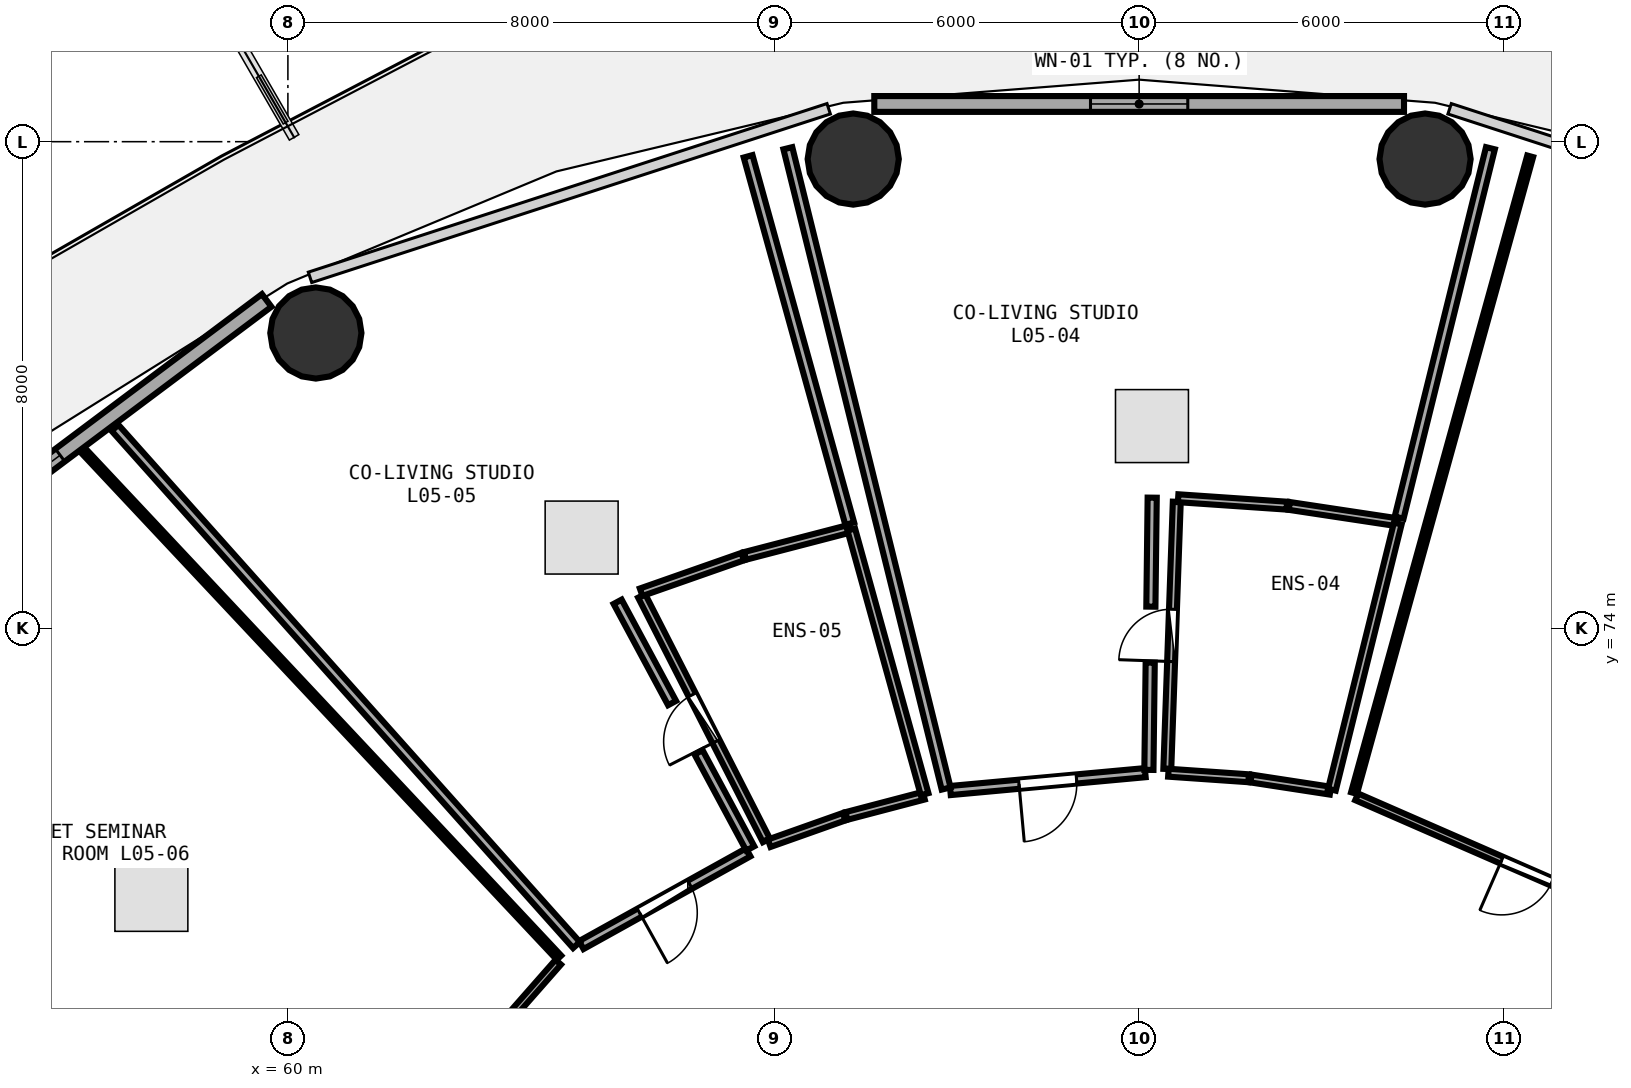
"""IFC4 building model, lengths in metres.
Left out: names, types, materials, properties, quantities, classifications, styles, units other than length and angle.
Written with IfcOpenShell. Run it as: python <this file> out.ifc"""

import sys

from ifc_helpers import new_model, si_unit, direction, frame, frame_2d, origin, origin_2d, place, context, subcontext, project, spatial, rectangle, circle, extrude, element, fill, save


model = new_model("IFC4")
c1 = context("Model", 3, precision=1e-05, world=origin(), true_north=direction((0.0, 1.0)))
c2 = subcontext(c1, "Body", "Model", "MODEL_VIEW")
j1 = project(units=[si_unit("LENGTHUNIT", "METRE"), si_unit("PLANEANGLEUNIT", "RADIAN")], contexts=[c1])
p1 = place(None, origin())
s1 = spatial("IfcSite", under=j1, at=p1, CompositionType="ELEMENT")
p2 = place(p1, origin())
s2 = spatial("IfcBuilding", under=s1, at=p2, CompositionType="ELEMENT")
p3 = place(p2, frame((0.0, 0.0, 22.5)))
s3 = spatial("IfcBuildingStorey", under=s2, at=p3, CompositionType="ELEMENT", Elevation=22.5)
for number, where, z_axis, x_axis in (
    (1, (78.702, 81.714, 0.0), (0.0, 0.0, 1.0), (1.0, 0.0, 0.0)),
    (2, (69.298, 81.714, 0.0), (0.0, 0.0, 1.0), (1.0, 0.0, 0.0)),
    (3, (60.46, 78.854, 0.0), (0.0, 0.0, 1.0), (1.0, 0.0, 0.0)),
):
    element("IfcColumn", number, at=place(p3, frame(where, z_axis=z_axis, x_axis=x_axis)), inside=s3, PredefinedType="COLUMN", context=c2, shape_type="SweptSolid", body=[
        extrude(circle(Radius=0.75, at=origin_2d()), origin(), (0.0, 0.0, 1.0), 3.75),
    ])
p4 = place(p3, frame((78.356, 82.62, 0.0), z_axis=(0.0, 0.0, 1.0), x_axis=(-1.0, 0.0, 0.0)))
e4 = element("IfcWall", 4, at=p4, inside=s3, PredefinedType="SOLIDWALL", context=c2, shape_type="SweptSolid", body=[
    extrude(rectangle(XDim=8.712, YDim=0.26, at=frame_2d((4.356, 0.0))), origin(), (0.0, 0.0, 1.0), 3.475),
])
p5 = place(p4, frame((3.556, 0.0, 0.85)))
e5 = element("IfcOpeningElement", 5, at=p5, cuts=e4, PredefinedType="OPENING", context=c2, shape_type="SweptSolid", body=[
    extrude(rectangle(XDim=1.6, YDim=1.45, at=frame_2d((0.8, 0.725))), frame((0.0, 0.14, 0.0), z_axis=(0.0, -1.0, 0.0), x_axis=(1.0, 0.0, 0.0)), (0.0, 0.0, 1.0), 0.28),
])
p6 = place(p3, frame((59.651, 79.389, 0.0), z_axis=(0.0, 0.0, 1.0), x_axis=(-0.80030733173, -0.599590005569, 0.0)))
e6 = element("IfcWall", 6, at=p6, inside=s3, PredefinedType="SOLIDWALL", context=c2, shape_type="SweptSolid", body=[
    extrude(rectangle(XDim=8.291, YDim=0.26, at=frame_2d((4.145, 0.0))), origin(), (0.0, 0.0, 1.0), 3.475),
])
p7 = place(p6, frame((4.245, 0.0, 0.85)))
e7 = element("IfcOpeningElement", 7, at=p7, cuts=e6, PredefinedType="OPENING", context=c2, shape_type="SweptSolid", body=[
    extrude(rectangle(XDim=1.6, YDim=1.45, at=frame_2d((0.8, 0.725))), frame((0.0, 0.14, 0.0), z_axis=(0.0, -1.0, 0.0), x_axis=(1.0, 0.0, 0.0)), (0.0, 0.0, 1.0), 0.28),
])
p8 = place(p3, frame((83.172, 68.783, 0.0), z_axis=(0.0, 0.0, 1.0), x_axis=(-0.916419655578, 0.400218708797, 0.0)))
e8 = element("IfcWall", 8, at=p8, inside=s3, PredefinedType="PARTITIONING", context=c2, shape_type="SweptSolid", body=[
    extrude(rectangle(XDim=6.104, YDim=0.12, at=frame_2d((3.052, 0.0))), origin(), (0.0, 0.0, 1.0), 2.875),
])
p9 = place(p8, frame((2.602, 0.0, 0.0)))
e9 = element("IfcOpeningElement", 9, at=p9, cuts=e8, PredefinedType="OPENING", context=c2, shape_type="SweptSolid", body=[
    extrude(rectangle(XDim=0.9, YDim=2.08, at=frame_2d((0.45, 1.04))), frame((0.0, 0.07, 0.0), z_axis=(0.0, -1.0, 0.0), x_axis=(1.0, 0.0, 0.0)), (0.0, 0.0, 1.0), 0.14),
])
p10 = place(p3, frame((74.463, 71.684, 0.0), z_axis=(0.0, 0.0, 1.0), x_axis=(0.035428098094, 0.999372227884, 0.0)))
e10 = element("IfcWall", 10, at=p10, inside=s3, PredefinedType="PLUMBINGWALL", context=c2, shape_type="SweptSolid", body=[
    extrude(rectangle(XDim=4.396, YDim=0.13, at=frame_2d((2.198, 0.0))), origin(), (0.0, 0.0, 1.0), 3.175),
])
p11 = place(p10, frame((1.768, 0.0, 0.0)))
e11 = element("IfcOpeningElement", 11, at=p11, cuts=e10, PredefinedType="OPENING", context=c2, shape_type="SweptSolid", body=[
    extrude(rectangle(XDim=0.86, YDim=2.05, at=frame_2d((0.43, 1.025))), frame((0.0, 0.075, 0.0), z_axis=(0.0, -1.0, 0.0), x_axis=(1.0, 0.0, 0.0)), (0.0, 0.0, 1.0), 0.15),
])
p12 = place(p3, frame((74.1, 71.624, 0.0), z_axis=(0.0, 0.0, 1.0), x_axis=(-0.995822031417, -0.091315287572, 0.0)))
e12 = element("IfcWall", 12, at=p12, inside=s3, PredefinedType="PARTITIONING", context=c2, shape_type="SweptSolid", body=[
    extrude(rectangle(XDim=3.219, YDim=0.15, at=frame_2d((1.609, 0.0))), origin(), (0.0, 0.0, 1.0), 3.235),
])
p13 = place(p12, frame((1.135, 0.0, 0.0)))
e13 = element("IfcOpeningElement", 13, at=p13, cuts=e12, PredefinedType="OPENING", context=c2, shape_type="SweptSolid", body=[
    extrude(rectangle(XDim=0.95, YDim=2.08, at=frame_2d((0.475, 1.04))), frame((0.0, 0.085, 0.0), z_axis=(0.0, -1.0, 0.0), x_axis=(1.0, 0.0, 0.0)), (0.0, 0.0, 1.0), 0.17),
])
p14 = place(p3, frame((67.87, 70.51, 0.0), z_axis=(0.0, 0.0, 1.0), x_axis=(-0.45442479933, 0.890785104138, 0.0)))
e14 = element("IfcWall", 14, at=p14, inside=s3, PredefinedType="PLUMBINGWALL", context=c2, shape_type="SweptSolid", body=[
    extrude(rectangle(XDim=4.514, YDim=0.13, at=frame_2d((2.257, 0.0))), origin(), (0.0, 0.0, 1.0), 3.175),
])
p15 = place(p14, frame((1.827, 0.0, 0.0)))
e15 = element("IfcOpeningElement", 15, at=p15, cuts=e14, PredefinedType="OPENING", context=c2, shape_type="SweptSolid", body=[
    extrude(rectangle(XDim=0.86, YDim=2.05, at=frame_2d((0.43, 1.025))), frame((0.0, 0.075, 0.0), z_axis=(0.0, -1.0, 0.0), x_axis=(1.0, 0.0, 0.0)), (0.0, 0.0, 1.0), 0.15),
])
p16 = place(p3, frame((67.571, 70.313, 0.0), z_axis=(0.0, 0.0, 1.0), x_axis=(-0.874179278891, -0.48560332408, 0.0)))
e16 = element("IfcWall", 16, at=p16, inside=s3, PredefinedType="PARTITIONING", context=c2, shape_type="SweptSolid", body=[
    extrude(rectangle(XDim=3.14, YDim=0.15, at=frame_2d((1.57, 0.0))), origin(), (0.0, 0.0, 1.0), 3.48),
])
p17 = place(p16, frame((1.095, 0.0, 0.0)))
e17 = element("IfcOpeningElement", 17, at=p17, cuts=e16, PredefinedType="OPENING", context=c2, shape_type="SweptSolid", body=[
    extrude(rectangle(XDim=0.95, YDim=2.08, at=frame_2d((0.475, 1.04))), frame((0.0, 0.085, 0.0), z_axis=(0.0, -1.0, 0.0), x_axis=(1.0, 0.0, 0.0)), (0.0, 0.0, 1.0), 0.17),
])
p18 = place(p3, frame((64.446, 68.507, 0.0), z_axis=(0.0, 0.0, 1.0), x_axis=(-0.660323401664, -0.75098136143, 0.0)))
e18 = element("IfcWall", 18, at=p18, inside=s3, PredefinedType="PARTITIONING", context=c2, shape_type="SweptSolid", body=[
    extrude(rectangle(XDim=5.857, YDim=0.12, at=frame_2d((2.929, 0.0))), origin(), (0.0, 0.0, 1.0), 2.875),
])
p19 = place(p18, frame((2.479, 0.0, 0.0)))
e19 = element("IfcOpeningElement", 19, at=p19, cuts=e18, PredefinedType="OPENING", context=c2, shape_type="SweptSolid", body=[
    extrude(rectangle(XDim=0.9, YDim=2.08, at=frame_2d((0.45, 1.04))), frame((0.0, 0.07, 0.0), z_axis=(0.0, -1.0, 0.0), x_axis=(1.0, 0.0, 0.0)), (0.0, 0.0, 1.0), 0.14),
])
p20 = place(p3, frame((77.534, 71.289, 0.0), z_axis=(0.0, 0.0, 1.0), x_axis=(0.26671307518, 0.963775977875, 0.0)))
e20 = element("IfcWall", 20, at=p20, inside=s3, PredefinedType="PARTITIONING", context=c2, shape_type="SweptSolid", body=[
    extrude(rectangle(XDim=10.865, YDim=0.1, at=frame_2d((5.432, 0.0))), origin(), (0.0, 0.0, 1.0), 2.875),
])
p21 = place(p3, frame((77.145, 71.327, 0.0), z_axis=(0.0, 0.0, 1.0), x_axis=(-0.988427236939, 0.151695739152, 0.0)))
e21 = element("IfcWall", 21, at=p21, inside=s3, PredefinedType="PLUMBINGWALL", context=c2, shape_type="SweptSolid", body=[
    extrude(rectangle(XDim=1.32, YDim=0.13, at=frame_2d((0.66, 0.0))), origin(), (0.0, 0.0, 1.0), 3.235),
])
p22 = place(p3, frame((75.801, 71.531, 0.0), z_axis=(0.0, 0.0, 1.0), x_axis=(-0.997629018134, 0.068821088175, 0.0)))
e22 = element("IfcWall", 22, at=p22, inside=s3, PredefinedType="PLUMBINGWALL", context=c2, shape_type="SweptSolid", body=[
    extrude(rectangle(XDim=1.323, YDim=0.13, at=frame_2d((0.662, 0.0))), origin(), (0.0, 0.0, 1.0), 3.48),
])
p23 = place(p3, frame((74.641, 76.137, 0.0), z_axis=(0.0, 0.0, 1.0), x_axis=(0.997667905772, -0.06825503493, 0.0)))
e23 = element("IfcWall", 23, at=p23, inside=s3, PredefinedType="PLUMBINGWALL", context=c2, shape_type="SweptSolid", body=[
    extrude(rectangle(XDim=1.792, YDim=0.13, at=frame_2d((0.896, 0.0))), origin(), (0.0, 0.0, 1.0), 3.48),
])
p24 = place(p3, frame((76.469, 76.01, 0.0), z_axis=(0.0, 0.0, 1.0), x_axis=(0.988799846431, -0.14924765894, 0.0)))
e24 = element("IfcWall", 24, at=p24, inside=s3, PredefinedType="PLUMBINGWALL", context=c2, shape_type="SweptSolid", body=[
    extrude(rectangle(XDim=1.79, YDim=0.13, at=frame_2d((0.895, 0.0))), origin(), (0.0, 0.0, 1.0), 3.48),
])
p25 = place(p3, frame((78.253, 75.721, 0.0), z_axis=(0.0, 0.0, 1.0), x_axis=(-0.240229117536, -0.970716215528, 0.0)))
e25 = element("IfcWall", 25, at=p25, inside=s3, PredefinedType="PLUMBINGWALL", context=c2, shape_type="SweptSolid", body=[
    extrude(rectangle(XDim=4.509, YDim=0.13, at=frame_2d((2.255, 0.0))), origin(), (0.0, 0.0, 1.0), 3.175),
])
p26 = place(p3, frame((70.825, 71.363, 0.0), z_axis=(0.0, 0.0, 1.0), x_axis=(-0.239971369295, 0.970779965759, 0.0)))
e26 = element("IfcWall", 26, at=p26, inside=s3, PredefinedType="PARTITIONING", context=c2, shape_type="SweptSolid", body=[
    extrude(rectangle(XDim=10.846, YDim=0.15, at=frame_2d((5.423, 0.0))), origin(), (0.0, 0.0, 1.0), 2.875),
])
p27 = place(p3, frame((79.777, 81.892, 0.0), z_axis=(0.0, 0.0, 1.0), x_axis=(-0.240000910349, -0.970772662899, 0.0)))
e27 = element("IfcWall", 27, at=p27, inside=s3, PredefinedType="PARTITIONING", context=c2, shape_type="SweptSolid", body=[
    extrude(rectangle(XDim=6.257, YDim=0.15, at=frame_2d((3.128, 0.0))), origin(), (0.0, 0.0, 1.0), 2.875),
])
p28 = place(p3, frame((74.215, 76.146, 0.0), z_axis=(0.0, 0.0, 1.0), x_axis=(-0.012119496596, -0.999926556204, 0.0)))
e28 = element("IfcWall", 28, at=p28, inside=s3, PredefinedType="PARTITIONING", context=c2, shape_type="SweptSolid", body=[
    extrude(rectangle(XDim=1.793, YDim=0.15, at=frame_2d((0.896, 0.0))), origin(), (0.0, 0.0, 1.0), 3.175),
])
p29 = place(p3, frame((74.182, 73.433, 0.0), z_axis=(0.0, 0.0, 1.0), x_axis=(-0.01217734225, -0.999925853419, 0.0)))
e29 = element("IfcWall", 29, at=p29, inside=s3, PredefinedType="PARTITIONING", context=c2, shape_type="SweptSolid", body=[
    extrude(rectangle(XDim=1.764, YDim=0.15, at=frame_2d((0.882, 0.0))), origin(), (0.0, 0.0, 1.0), 3.48),
])
p30 = place(p3, frame((70.458, 71.245, 0.0), z_axis=(0.0, 0.0, 1.0), x_axis=(-0.967235526128, -0.253880753498, 0.0)))
e30 = element("IfcWall", 30, at=p30, inside=s3, PredefinedType="PLUMBINGWALL", context=c2, shape_type="SweptSolid", body=[
    extrude(rectangle(XDim=1.314, YDim=0.13, at=frame_2d((0.657, 0.0))), origin(), (0.0, 0.0, 1.0), 3.235),
])
p31 = place(p3, frame((69.148, 70.899, 0.0), z_axis=(0.0, 0.0, 1.0), x_axis=(-0.942537812533, -0.33409949408, 0.0)))
e31 = element("IfcWall", 31, at=p31, inside=s3, PredefinedType="PLUMBINGWALL", context=c2, shape_type="SweptSolid", body=[
    extrude(rectangle(XDim=1.307, YDim=0.13, at=frame_2d((0.654, 0.0))), origin(), (0.0, 0.0, 1.0), 3.48),
])
p32 = place(p3, frame((65.81, 74.591, 0.0), z_axis=(0.0, 0.0, 1.0), x_axis=(0.943615101484, 0.331044619728, 0.0)))
e32 = element("IfcWall", 32, at=p32, inside=s3, PredefinedType="PLUMBINGWALL", context=c2, shape_type="SweptSolid", body=[
    extrude(rectangle(XDim=1.77, YDim=0.13, at=frame_2d((0.885, 0.0))), origin(), (0.0, 0.0, 1.0), 3.48),
])
p33 = place(p3, frame((67.518, 75.188, 0.0), z_axis=(0.0, 0.0, 1.0), x_axis=(0.967790422801, 0.251757219427, 0.0)))
e33 = element("IfcWall", 33, at=p33, inside=s3, PredefinedType="PLUMBINGWALL", context=c2, shape_type="SweptSolid", body=[
    extrude(rectangle(XDim=1.78, YDim=0.13, at=frame_2d((0.89, 0.0))), origin(), (0.0, 0.0, 1.0), 3.48),
])
p34 = place(p3, frame((69.265, 75.622, 0.0), z_axis=(0.0, 0.0, 1.0), x_axis=(0.267094578575, -0.963670320232, 0.0)))
e34 = element("IfcWall", 34, at=p34, inside=s3, PredefinedType="PLUMBINGWALL", context=c2, shape_type="SweptSolid", body=[
    extrude(rectangle(XDim=4.516, YDim=0.13, at=frame_2d((2.258, 0.0))), origin(), (0.0, 0.0, 1.0), 2.875),
])
p35 = place(p3, frame((64.746, 68.789, 0.0), z_axis=(0.0, 0.0, 1.0), x_axis=(-0.66580890104, 0.746122313897, 0.0)))
e35 = element("IfcWall", 35, at=p35, inside=s3, PredefinedType="PARTITIONING", context=c2, shape_type="SweptSolid", body=[
    extrude(rectangle(XDim=11.399, YDim=0.15, at=frame_2d((5.7, 0.0))), origin(), (0.0, 0.0, 1.0), 2.875),
])
p36 = place(p3, frame((67.569, 81.76, 0.0), z_axis=(0.0, 0.0, 1.0), x_axis=(0.266691519666, -0.963781942837, 0.0)))
e36 = element("IfcWall", 36, at=p36, inside=s3, PredefinedType="PARTITIONING", context=c2, shape_type="SweptSolid", body=[
    extrude(rectangle(XDim=6.268, YDim=0.15, at=frame_2d((3.134, 0.0))), origin(), (0.0, 0.0, 1.0), 2.875),
])
p37 = place(p3, frame((65.423, 74.434, 0.0), z_axis=(0.0, 0.0, 1.0), x_axis=(0.473660949034, -0.880707275637, 0.0)))
e37 = element("IfcWall", 37, at=p37, inside=s3, PredefinedType="PARTITIONING", context=c2, shape_type="SweptSolid", body=[
    extrude(rectangle(XDim=1.891, YDim=0.15, at=frame_2d((0.946, 0.0))), origin(), (0.0, 0.0, 1.0), 3.175),
])
p38 = place(p3, frame((66.754, 71.958, 0.0), z_axis=(0.0, 0.0, 1.0), x_axis=(0.473466863657, -0.880811630838, 0.0)))
e38 = element("IfcWall", 38, at=p38, inside=s3, PredefinedType="PARTITIONING", context=c2, shape_type="SweptSolid", body=[
    extrude(rectangle(XDim=1.794, YDim=0.15, at=frame_2d((0.897, 0.0))), origin(), (0.0, 0.0, 1.0), 3.235),
])
p39 = place(p3, frame((60.502, 64.079, 0.0), z_axis=(0.0, 0.0, 1.0), x_axis=(-0.917695041134, 0.397285554077, 0.0)))
e39 = element("IfcWall", 39, at=p39, inside=s3, PredefinedType="PARTITIONING", context=c2, shape_type="SweptSolid", body=[
    extrude(rectangle(XDim=12.07, YDim=0.1, at=frame_2d((6.035, 0.0))), origin(), (0.0, 0.0, 1.0), 2.875),
])
p40 = place(p3, frame((56.632, 76.922, 0.0), z_axis=(0.0, 0.0, 1.0), x_axis=(0.684261294523, -0.729236916796, 0.0)))
e40 = element("IfcWall", 40, at=p40, inside=s3, PredefinedType="PARTITIONING", context=c2, shape_type="SweptSolid", body=[
    extrude(rectangle(XDim=11.438, YDim=0.1, at=frame_2d((5.719, 0.0))), origin(), (0.0, 0.0, 1.0), 2.875),
])
p41 = place(p5, origin())
e41 = element("IfcWindow", 41, at=p41, inside=s3, PartitioningType="SINGLE_PANEL", PredefinedType="WINDOW", context=c2, shape_type="SweptSolid", body=[
    extrude(rectangle(XDim=1.6, YDim=1.45, at=frame_2d((0.8, 0.725))), frame((0.0, 0.03, 0.0), z_axis=(0.0, -1.0, 0.0), x_axis=(1.0, 0.0, 0.0)), (0.0, 0.0, 1.0), 0.06),
])
fill(e5, e41)
p42 = place(p7, origin())
e42 = element("IfcWindow", 42, at=p42, inside=s3, PartitioningType="SINGLE_PANEL", PredefinedType="WINDOW", context=c2, shape_type="SweptSolid", body=[
    extrude(rectangle(XDim=1.6, YDim=1.45, at=frame_2d((0.8, 0.725))), frame((0.0, 0.03, 0.0), z_axis=(0.0, -1.0, 0.0), x_axis=(1.0, 0.0, 0.0)), (0.0, 0.0, 1.0), 0.06),
])
fill(e7, e42)
p43 = place(p9, origin())
e43 = element("IfcDoor", 43, at=p43, inside=s3, OperationType="SINGLE_SWING_RIGHT", PredefinedType="DOOR", context=c2, shape_type="SweptSolid", body=[
    extrude(rectangle(XDim=0.9, YDim=2.08, at=frame_2d((0.45, 1.04))), frame((0.0, 0.025, 0.0), z_axis=(0.0, -1.0, 0.0), x_axis=(1.0, 0.0, 0.0)), (0.0, 0.0, 1.0), 0.05),
])
fill(e9, e43)
p44 = place(p11, origin())
e44 = element("IfcDoor", 44, at=p44, inside=s3, OperationType="SINGLE_SWING_LEFT", PredefinedType="DOOR", context=c2, shape_type="SweptSolid", body=[
    extrude(rectangle(XDim=0.86, YDim=2.05, at=frame_2d((0.43, 1.025))), frame((0.0, 0.025, 0.0), z_axis=(0.0, -1.0, 0.0), x_axis=(1.0, 0.0, 0.0)), (0.0, 0.0, 1.0), 0.05),
])
fill(e11, e44)
p45 = place(p13, origin())
e45 = element("IfcDoor", 45, at=p45, inside=s3, OperationType="SINGLE_SWING_RIGHT", PredefinedType="DOOR", context=c2, shape_type="SweptSolid", body=[
    extrude(rectangle(XDim=0.95, YDim=2.08, at=frame_2d((0.475, 1.04))), frame((0.0, 0.025, 0.0), z_axis=(0.0, -1.0, 0.0), x_axis=(1.0, 0.0, 0.0)), (0.0, 0.0, 1.0), 0.05),
])
fill(e13, e45)
p46 = place(p15, origin())
e46 = element("IfcDoor", 46, at=p46, inside=s3, OperationType="SINGLE_SWING_LEFT", PredefinedType="DOOR", context=c2, shape_type="SweptSolid", body=[
    extrude(rectangle(XDim=0.86, YDim=2.05, at=frame_2d((0.43, 1.025))), frame((0.0, 0.025, 0.0), z_axis=(0.0, -1.0, 0.0), x_axis=(1.0, 0.0, 0.0)), (0.0, 0.0, 1.0), 0.05),
])
fill(e15, e46)
p47 = place(p17, origin())
e47 = element("IfcDoor", 47, at=p47, inside=s3, OperationType="SINGLE_SWING_RIGHT", PredefinedType="DOOR", context=c2, shape_type="SweptSolid", body=[
    extrude(rectangle(XDim=0.95, YDim=2.08, at=frame_2d((0.475, 1.04))), frame((0.0, 0.025, 0.0), z_axis=(0.0, -1.0, 0.0), x_axis=(1.0, 0.0, 0.0)), (0.0, 0.0, 1.0), 0.05),
])
fill(e17, e47)
save(model, sys.argv[1])
